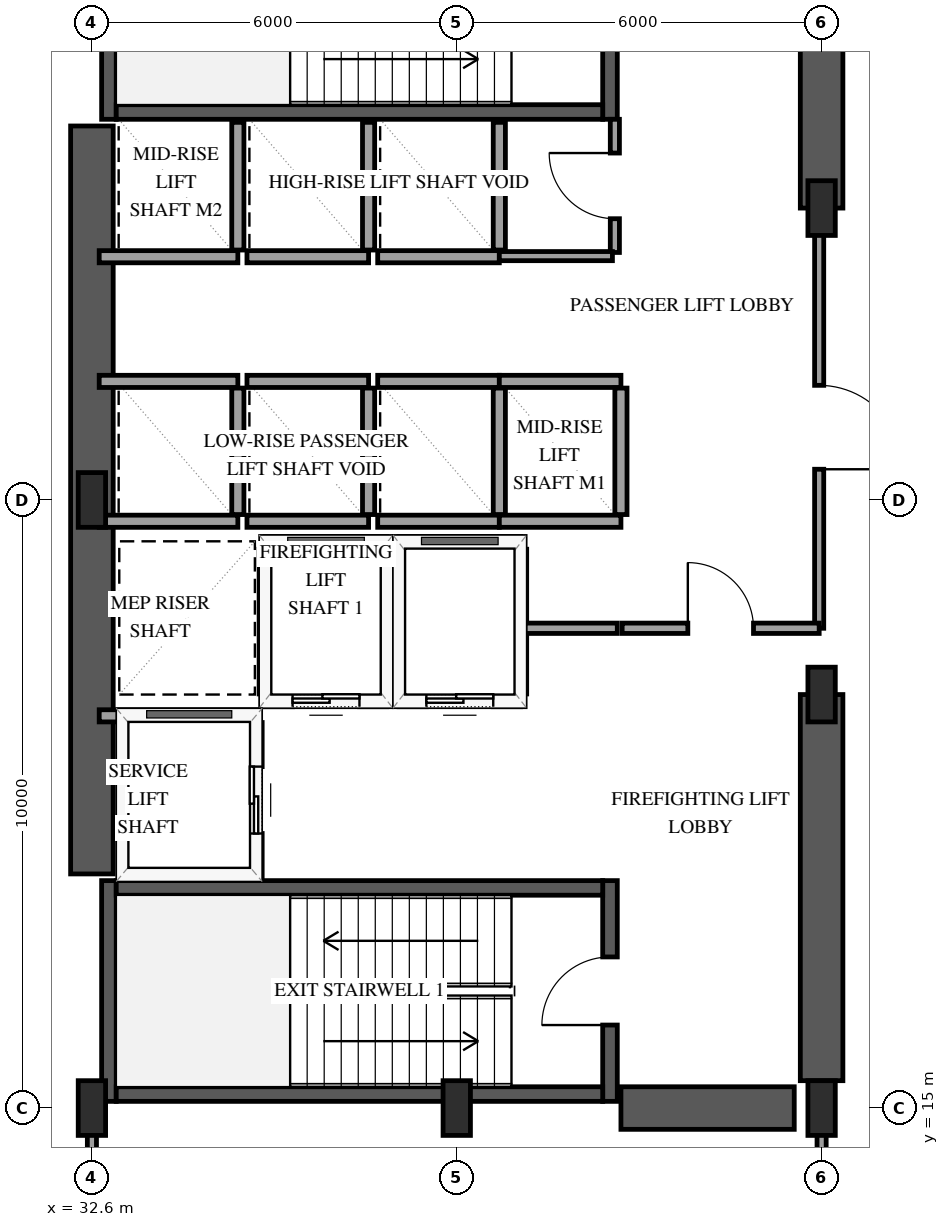
"""IFC4 building model, lengths in metres.
Left out: names, types, materials, properties, quantities, classifications, styles, units other than length and angle.
Written with IfcOpenShell. Run it as: python <this file> out.ifc"""

import sys

from ifc_helpers import new_model, si_unit, direction, frame, frame_2d, origin, origin_2d, place, context, subcontext, project, spatial, rectangle, extrude, element, fill, save


model = new_model("IFC4")
c1 = context("Model", 3, precision=1e-05, world=origin(), true_north=direction((0.0, 1.0)))
c2 = subcontext(c1, "Body", "Model", "MODEL_VIEW")
j1 = project(units=[si_unit("LENGTHUNIT", "METRE"), si_unit("PLANEANGLEUNIT", "RADIAN")], contexts=[c1])
p1 = place(None, origin())
s1 = spatial("IfcSite", under=j1, at=p1, CompositionType="ELEMENT")
p2 = place(p1, origin())
s2 = spatial("IfcBuilding", under=s1, at=p2, CompositionType="ELEMENT")
p3 = place(p2, frame((0.0, 0.0, 11.4)))
s3 = spatial("IfcBuildingStorey", under=s2, at=p3, CompositionType="ELEMENT", Elevation=11.4)
p4 = place(p3, frame((32.88, 15.11, 0.0), z_axis=(0.0, 0.0, 1.0), x_axis=(0.0, 1.0, 0.0)))
e1 = element("IfcWall", 1, at=p4, inside=s3, PredefinedType="SHEAR", context=c2, shape_type="SweptSolid", body=[
    extrude(rectangle(XDim=3.63, YDim=0.24, at=frame_2d((1.815, 0.0))), origin(), (0.0, 0.0, 1.0), 4.8),
])
p5 = place(p3, frame((41.12, 15.11, 0.0), z_axis=(0.0, 0.0, 1.0), x_axis=(0.0, 1.0, 0.0)))
e2 = element("IfcWall", 2, at=p5, inside=s3, PredefinedType="SHEAR", context=c2, shape_type="SweptSolid", body=[
    extrude(rectangle(XDim=3.63, YDim=0.24, at=frame_2d((1.815, 0.0))), origin(), (0.0, 0.0, 1.0), 4.8),
])
p6 = place(p5, frame((1.255, 0.0, 0.0)))
e3 = element("IfcOpeningElement", 3, at=p6, cuts=e2, PredefinedType="OPENING", context=c2, shape_type="SweptSolid", body=[
    extrude(rectangle(XDim=1.12, YDim=2.15, at=frame_2d((0.56, 1.075))), frame((0.0, 0.13, 0.0), z_axis=(0.0, -1.0, 0.0), x_axis=(1.0, 0.0, 0.0)), (0.0, 0.0, 1.0), 0.26),
])
for number, where, z_axis, x_axis in (
    (4, (33.0, 15.23, 0.0), (0.0, 0.0, 1.0), (1.0, 0.0, 0.0)),
    (5, (33.0, 18.62, 0.0), (0.0, 0.0, 1.0), (1.0, 0.0, 0.0)),
):
    element("IfcWall", number, at=place(p3, frame(where, z_axis=z_axis, x_axis=x_axis)), inside=s3, PredefinedType="SHEAR", context=c2, shape_type="SweptSolid", body=[
        extrude(rectangle(XDim=8.0, YDim=0.24, at=frame_2d((4.0, 0.0))), origin(), (0.0, 0.0, 1.0), 4.8),
    ])
p7 = place(p3, frame((32.88, 31.26, 0.0), z_axis=(0.0, 0.0, 1.0), x_axis=(0.0, 1.0, 0.0)))
e6 = element("IfcWall", 6, at=p7, inside=s3, PredefinedType="SHEAR", context=c2, shape_type="SweptSolid", body=[
    extrude(rectangle(XDim=3.63, YDim=0.24, at=frame_2d((1.815, 0.0))), origin(), (0.0, 0.0, 1.0), 4.8),
])
p8 = place(p3, frame((41.12, 31.26, 0.0), z_axis=(0.0, 0.0, 1.0), x_axis=(0.0, 1.0, 0.0)))
e7 = element("IfcWall", 7, at=p8, inside=s3, PredefinedType="SHEAR", context=c2, shape_type="SweptSolid", body=[
    extrude(rectangle(XDim=3.63, YDim=0.24, at=frame_2d((1.815, 0.0))), origin(), (0.0, 0.0, 1.0), 4.8),
])
p9 = place(p8, frame((1.255, 0.0, 0.0)))
e8 = element("IfcOpeningElement", 8, at=p9, cuts=e7, PredefinedType="OPENING", context=c2, shape_type="SweptSolid", body=[
    extrude(rectangle(XDim=1.12, YDim=2.15, at=frame_2d((0.56, 1.075))), frame((0.0, 0.13, 0.0), z_axis=(0.0, -1.0, 0.0), x_axis=(1.0, 0.0, 0.0)), (0.0, 0.0, 1.0), 0.26),
])
p10 = place(p3, frame((33.0, 31.38, 0.0), z_axis=(0.0, 0.0, 1.0), x_axis=(1.0, 0.0, 0.0)))
e9 = element("IfcWall", 9, at=p10, inside=s3, PredefinedType="SHEAR", context=c2, shape_type="SweptSolid", body=[
    extrude(rectangle(XDim=8.0, YDim=0.24, at=frame_2d((4.0, 0.0))), origin(), (0.0, 0.0, 1.0), 4.8),
])
p11 = place(p3, frame((32.6, 18.85, 0.0), z_axis=(0.0, 0.0, 1.0), x_axis=(0.0, 1.0, 0.0)))
e10 = element("IfcWall", 10, at=p11, inside=s3, PredefinedType="SHEAR", context=c2, shape_type="SweptSolid", body=[
    extrude(rectangle(XDim=12.3, YDim=0.7, at=frame_2d((6.15, 0.0))), origin(), (0.0, 0.0, 1.0), 4.8),
])
p12 = place(p3, frame((41.3, 15.0, 0.0), z_axis=(0.0, 0.0, 1.0), x_axis=(1.0, 0.0, 0.0)))
e11 = element("IfcWall", 11, at=p12, inside=s3, PredefinedType="SHEAR", context=c2, shape_type="SweptSolid", body=[
    extrude(rectangle(XDim=2.85, YDim=0.7, at=frame_2d((1.425, 0.0))), origin(), (0.0, 0.0, 1.0), 4.8),
])
p13 = place(p3, frame((44.6, 15.45, 0.0), z_axis=(0.0, 0.0, 1.0), x_axis=(0.0, 1.0, 0.0)))
e12 = element("IfcWall", 12, at=p13, inside=s3, PredefinedType="SHEAR", context=c2, shape_type="SweptSolid", body=[
    extrude(rectangle(XDim=6.35, YDim=0.7, at=frame_2d((3.175, 0.0))), origin(), (0.0, 0.0, 1.0), 4.8),
])
p14 = place(p3, frame((44.6, 29.8, 0.0), z_axis=(0.0, 0.0, 1.0), x_axis=(0.0, 1.0, 0.0)))
e13 = element("IfcWall", 13, at=p14, inside=s3, PredefinedType="SHEAR", context=c2, shape_type="SweptSolid", body=[
    extrude(rectangle(XDim=4.75, YDim=0.7, at=frame_2d((2.375, 0.0))), origin(), (0.0, 0.0, 1.0), 4.8),
])
for number, where, z_axis, x_axis in (
    (14, (32.6, 15.0, 0.0), (0.0, 0.0, 1.0), (1.0, 0.0, 0.0)),
    (15, (32.6, 25.0, 0.0), (0.0, 0.0, 1.0), (1.0, 0.0, 0.0)),
    (16, (38.6, 15.0, 0.0), (0.0, 0.0, 1.0), (1.0, 0.0, 0.0)),
    (17, (44.6, 15.0, 0.0), (0.0, 0.0, 1.0), (1.0, 0.0, 0.0)),
    (18, (44.6, 21.8, 0.0), (0.0, 0.0, 1.0), (1.0, 0.0, 0.0)),
    (19, (44.6, 29.8, 0.0), (0.0, 0.0, 1.0), (1.0, 0.0, 0.0)),
):
    element("IfcColumn", number, at=place(p3, frame(where, z_axis=z_axis, x_axis=x_axis)), inside=s3, PredefinedType="PILASTER", context=c2, shape_type="SweptSolid", body=[
        extrude(rectangle(XDim=0.45, YDim=0.9, at=origin_2d()), origin(), (0.0, 0.0, 1.0), 4.8),
    ])
p15 = place(p3, frame((35.45, 21.7, 0.0), z_axis=(0.0, 0.0, 1.0), x_axis=(1.0, 0.0, 0.0)))
e20 = element("IfcWall", 20, at=p15, inside=s3, PredefinedType="SOLIDWALL", context=c2, shape_type="SweptSolid", body=[
    extrude(rectangle(XDim=2.0, YDim=0.2, at=frame_2d((1.0, 0.0))), origin(), (0.0, 0.0, 1.0), 4.48),
])
p16 = place(p15, frame((0.45, 0.0, 0.0)))
e21 = element("IfcOpeningElement", 21, at=p16, cuts=e20, PredefinedType="OPENING", context=c2, shape_type="SweptSolid", body=[
    extrude(rectangle(XDim=1.1, YDim=2.15, at=frame_2d((0.55, 1.075))), frame((0.0, 0.11, 0.0), z_axis=(0.0, -1.0, 0.0), x_axis=(1.0, 0.0, 0.0)), (0.0, 0.0, 1.0), 0.22),
])
p17 = place(p3, frame((35.45, 24.3, 0.0), z_axis=(0.0, 0.0, 1.0), x_axis=(1.0, 0.0, 0.0)))
e22 = element("IfcWall", 22, at=p17, inside=s3, PredefinedType="SOLIDWALL", context=c2, shape_type="SweptSolid", body=[
    extrude(rectangle(XDim=2.0, YDim=0.2, at=frame_2d((1.0, 0.0))), origin(), (0.0, 0.0, 1.0), 4.48),
])
for number, where, z_axis, x_axis in (
    (23, (35.45, 21.81, 0.0), (0.0, 0.0, 1.0), (0.0, 1.0, 0.0)),
    (24, (37.45, 21.81, 0.0), (0.0, 0.0, 1.0), (0.0, 1.0, 0.0)),
):
    element("IfcWall", number, at=place(p3, frame(where, z_axis=z_axis, x_axis=x_axis)), inside=s3, PredefinedType="SOLIDWALL", context=c2, shape_type="SweptSolid", body=[
        extrude(rectangle(XDim=2.38, YDim=0.2, at=frame_2d((1.19, 0.0))), origin(), (0.0, 0.0, 1.0), 4.48),
    ])
p18 = place(p3, frame((37.65, 21.7, 0.0), z_axis=(0.0, 0.0, 1.0), x_axis=(1.0, 0.0, 0.0)))
e25 = element("IfcWall", 25, at=p18, inside=s3, PredefinedType="SOLIDWALL", context=c2, shape_type="SweptSolid", body=[
    extrude(rectangle(XDim=2.0, YDim=0.2, at=frame_2d((1.0, 0.0))), origin(), (0.0, 0.0, 1.0), 4.48),
])
p19 = place(p18, frame((0.45, 0.0, 0.0)))
e26 = element("IfcOpeningElement", 26, at=p19, cuts=e25, PredefinedType="OPENING", context=c2, shape_type="SweptSolid", body=[
    extrude(rectangle(XDim=1.1, YDim=2.15, at=frame_2d((0.55, 1.075))), frame((0.0, 0.11, 0.0), z_axis=(0.0, -1.0, 0.0), x_axis=(1.0, 0.0, 0.0)), (0.0, 0.0, 1.0), 0.22),
])
p20 = place(p3, frame((37.65, 24.3, 0.0), z_axis=(0.0, 0.0, 1.0), x_axis=(1.0, 0.0, 0.0)))
e27 = element("IfcWall", 27, at=p20, inside=s3, PredefinedType="SOLIDWALL", context=c2, shape_type="SweptSolid", body=[
    extrude(rectangle(XDim=2.0, YDim=0.2, at=frame_2d((1.0, 0.0))), origin(), (0.0, 0.0, 1.0), 4.48),
])
p21 = place(p3, frame((39.65, 21.81, 0.0), z_axis=(0.0, 0.0, 1.0), x_axis=(0.0, 1.0, 0.0)))
e28 = element("IfcWall", 28, at=p21, inside=s3, PredefinedType="SOLIDWALL", context=c2, shape_type="SweptSolid", body=[
    extrude(rectangle(XDim=2.38, YDim=0.2, at=frame_2d((1.19, 0.0))), origin(), (0.0, 0.0, 1.0), 4.48),
])
p22 = place(p3, frame((32.72, 21.45, 0.0), z_axis=(0.0, 0.0, 1.0), x_axis=(1.0, 0.0, 0.0)))
e29 = element("IfcWall", 29, at=p22, inside=s3, PredefinedType="SOLIDWALL", context=c2, shape_type="SweptSolid", body=[
    extrude(rectangle(XDim=2.58, YDim=0.2, at=frame_2d((1.29, 0.0))), origin(), (0.0, 0.0, 1.0), 4.48),
])
p23 = place(p3, frame((35.3, 18.79, 0.0), z_axis=(0.0, 0.0, 1.0), x_axis=(0.0, 1.0, 0.0)))
e30 = element("IfcWall", 30, at=p23, inside=s3, PredefinedType="SOLIDWALL", context=c2, shape_type="SweptSolid", body=[
    extrude(rectangle(XDim=2.55, YDim=0.2, at=frame_2d((1.275, 0.0))), origin(), (0.0, 0.0, 1.0), 4.48),
])
p24 = place(p23, frame((0.725, 0.0, 0.0)))
e31 = element("IfcOpeningElement", 31, at=p24, cuts=e30, PredefinedType="OPENING", context=c2, shape_type="SweptSolid", body=[
    extrude(rectangle(XDim=1.1, YDim=2.15, at=frame_2d((0.55, 1.075))), frame((0.0, 0.11, 0.0), z_axis=(0.0, -1.0, 0.0), x_axis=(1.0, 0.0, 0.0)), (0.0, 0.0, 1.0), 0.22),
])
for number, where, z_axis, x_axis in (
    (32, (32.72, 24.65, 0.0), (0.0, 0.0, 1.0), (1.0, 0.0, 0.0)),
    (33, (32.72, 26.95, 0.0), (0.0, 0.0, 1.0), (1.0, 0.0, 0.0)),
):
    element("IfcWall", number, at=place(p3, frame(where, z_axis=z_axis, x_axis=x_axis)), inside=s3, PredefinedType="SOLIDWALL", context=c2, shape_type="SweptSolid", body=[
        extrude(rectangle(XDim=2.28, YDim=0.2, at=frame_2d((1.14, 0.0))), origin(), (0.0, 0.0, 1.0), 4.48),
    ])
p25 = place(p3, frame((35.0, 24.76, 0.0), z_axis=(0.0, 0.0, 1.0), x_axis=(0.0, 1.0, 0.0)))
e34 = element("IfcWall", 34, at=p25, inside=s3, PredefinedType="SOLIDWALL", context=c2, shape_type="SweptSolid", body=[
    extrude(rectangle(XDim=2.08, YDim=0.2, at=frame_2d((1.04, 0.0))), origin(), (0.0, 0.0, 1.0), 4.48),
])
for number, where, z_axis, x_axis in (
    (35, (35.15, 24.65, 0.0), (0.0, 0.0, 1.0), (1.0, 0.0, 0.0)),
    (36, (35.15, 26.95, 0.0), (0.0, 0.0, 1.0), (1.0, 0.0, 0.0)),
):
    element("IfcWall", number, at=place(p3, frame(where, z_axis=z_axis, x_axis=x_axis)), inside=s3, PredefinedType="SOLIDWALL", context=c2, shape_type="SweptSolid", body=[
        extrude(rectangle(XDim=2.0, YDim=0.2, at=frame_2d((1.0, 0.0))), origin(), (0.0, 0.0, 1.0), 4.48),
    ])
p26 = place(p3, frame((37.15, 24.76, 0.0), z_axis=(0.0, 0.0, 1.0), x_axis=(0.0, 1.0, 0.0)))
e37 = element("IfcWall", 37, at=p26, inside=s3, PredefinedType="SOLIDWALL", context=c2, shape_type="SweptSolid", body=[
    extrude(rectangle(XDim=2.08, YDim=0.2, at=frame_2d((1.04, 0.0))), origin(), (0.0, 0.0, 1.0), 4.48),
])
for number, where, z_axis, x_axis in (
    (38, (37.3, 24.65, 0.0), (0.0, 0.0, 1.0), (1.0, 0.0, 0.0)),
    (39, (37.3, 26.95, 0.0), (0.0, 0.0, 1.0), (1.0, 0.0, 0.0)),
):
    element("IfcWall", number, at=place(p3, frame(where, z_axis=z_axis, x_axis=x_axis)), inside=s3, PredefinedType="SOLIDWALL", context=c2, shape_type="SweptSolid", body=[
        extrude(rectangle(XDim=2.0, YDim=0.2, at=frame_2d((1.0, 0.0))), origin(), (0.0, 0.0, 1.0), 4.48),
    ])
p27 = place(p3, frame((39.3, 24.76, 0.0), z_axis=(0.0, 0.0, 1.0), x_axis=(0.0, 1.0, 0.0)))
e40 = element("IfcWall", 40, at=p27, inside=s3, PredefinedType="SOLIDWALL", context=c2, shape_type="SweptSolid", body=[
    extrude(rectangle(XDim=2.08, YDim=0.2, at=frame_2d((1.04, 0.0))), origin(), (0.0, 0.0, 1.0), 4.48),
])
for number, where, z_axis, x_axis in (
    (41, (39.3, 24.65, 0.0), (0.0, 0.0, 1.0), (1.0, 0.0, 0.0)),
    (42, (39.3, 26.95, 0.0), (0.0, 0.0, 1.0), (1.0, 0.0, 0.0)),
):
    element("IfcWall", number, at=place(p3, frame(where, z_axis=z_axis, x_axis=x_axis)), inside=s3, PredefinedType="SOLIDWALL", context=c2, shape_type="SweptSolid", body=[
        extrude(rectangle(XDim=2.0, YDim=0.2, at=frame_2d((1.0, 0.0))), origin(), (0.0, 0.0, 1.0), 4.48),
    ])
p28 = place(p3, frame((41.3, 24.76, 0.0), z_axis=(0.0, 0.0, 1.0), x_axis=(0.0, 1.0, 0.0)))
e43 = element("IfcWall", 43, at=p28, inside=s3, PredefinedType="SOLIDWALL", context=c2, shape_type="SweptSolid", body=[
    extrude(rectangle(XDim=2.08, YDim=0.2, at=frame_2d((1.04, 0.0))), origin(), (0.0, 0.0, 1.0), 4.48),
])
p29 = place(p3, frame((32.72, 29.0, 0.0), z_axis=(0.0, 0.0, 1.0), x_axis=(1.0, 0.0, 0.0)))
e44 = element("IfcWall", 44, at=p29, inside=s3, PredefinedType="SOLIDWALL", context=c2, shape_type="SweptSolid", body=[
    extrude(rectangle(XDim=2.28, YDim=0.2, at=frame_2d((1.14, 0.0))), origin(), (0.0, 0.0, 1.0), 4.48),
])
p30 = place(p3, frame((35.0, 29.11, 0.0), z_axis=(0.0, 0.0, 1.0), x_axis=(0.0, 1.0, 0.0)))
e45 = element("IfcWall", 45, at=p30, inside=s3, PredefinedType="SOLIDWALL", context=c2, shape_type="SweptSolid", body=[
    extrude(rectangle(XDim=2.1, YDim=0.2, at=frame_2d((1.05, 0.0))), origin(), (0.0, 0.0, 1.0), 4.48),
])
p31 = place(p3, frame((35.15, 29.0, 0.0), z_axis=(0.0, 0.0, 1.0), x_axis=(1.0, 0.0, 0.0)))
e46 = element("IfcWall", 46, at=p31, inside=s3, PredefinedType="SOLIDWALL", context=c2, shape_type="SweptSolid", body=[
    extrude(rectangle(XDim=2.0, YDim=0.2, at=frame_2d((1.0, 0.0))), origin(), (0.0, 0.0, 1.0), 4.48),
])
p32 = place(p3, frame((37.15, 29.11, 0.0), z_axis=(0.0, 0.0, 1.0), x_axis=(0.0, 1.0, 0.0)))
e47 = element("IfcWall", 47, at=p32, inside=s3, PredefinedType="SOLIDWALL", context=c2, shape_type="SweptSolid", body=[
    extrude(rectangle(XDim=2.1, YDim=0.2, at=frame_2d((1.05, 0.0))), origin(), (0.0, 0.0, 1.0), 4.48),
])
p33 = place(p3, frame((37.3, 29.0, 0.0), z_axis=(0.0, 0.0, 1.0), x_axis=(1.0, 0.0, 0.0)))
e48 = element("IfcWall", 48, at=p33, inside=s3, PredefinedType="SOLIDWALL", context=c2, shape_type="SweptSolid", body=[
    extrude(rectangle(XDim=2.0, YDim=0.2, at=frame_2d((1.0, 0.0))), origin(), (0.0, 0.0, 1.0), 4.48),
])
p34 = place(p3, frame((39.3, 29.11, 0.0), z_axis=(0.0, 0.0, 1.0), x_axis=(0.0, 1.0, 0.0)))
e49 = element("IfcWall", 49, at=p34, inside=s3, PredefinedType="SOLIDWALL", context=c2, shape_type="SweptSolid", body=[
    extrude(rectangle(XDim=2.1, YDim=0.2, at=frame_2d((1.05, 0.0))), origin(), (0.0, 0.0, 1.0), 4.48),
])
p35 = place(p3, frame((32.6, 14.93, 0.0), z_axis=(0.0, 0.0, 1.0), x_axis=(0.0, -1.0, 0.0)))
e50 = element("IfcWall", 50, at=p35, inside=s3, PredefinedType="PARTITIONING", context=c2, shape_type="SweptSolid", body=[
    extrude(rectangle(XDim=7.86, YDim=0.15, at=frame_2d((3.93, 0.0))), origin(), (0.0, 0.0, 1.0), 3.602),
])
p36 = place(p3, frame((44.56, 29.8, 0.0), z_axis=(0.0, 0.0, 1.0), x_axis=(0.0, -1.0, 0.0)))
e51 = element("IfcWall", 51, at=p36, inside=s3, PredefinedType="PARTITIONING", context=c2, shape_type="SweptSolid", body=[
    extrude(rectangle(XDim=6.91, YDim=0.15, at=frame_2d((3.455, 0.0))), origin(), (0.0, 0.0, 1.0), 3.52),
])
p37 = place(p36, frame((2.915, 0.0, 0.0)))
e52 = element("IfcOpeningElement", 52, at=p37, cuts=e51, PredefinedType="OPENING", context=c2, shape_type="SweptSolid", body=[
    extrude(rectangle(XDim=1.38, YDim=2.2, at=frame_2d((0.69, 1.1))), frame((0.0, 0.085, 0.0), z_axis=(0.0, -1.0, 0.0), x_axis=(1.0, 0.0, 0.0)), (0.0, 0.0, 1.0), 0.17),
])
p38 = place(p3, frame((41.32, 22.89, 0.0), z_axis=(0.0, 0.0, 1.0), x_axis=(1.0, 0.0, 0.0)))
e53 = element("IfcWall", 53, at=p38, inside=s3, PredefinedType="PARTITIONING", context=c2, shape_type="SweptSolid", body=[
    extrude(rectangle(XDim=3.24, YDim=0.17, at=frame_2d((1.62, 0.0))), origin(), (0.0, 0.0, 1.0), 4.48),
])
p39 = place(p38, frame((1.08, 0.0, 0.0)))
e54 = element("IfcOpeningElement", 54, at=p39, cuts=e53, PredefinedType="OPENING", context=c2, shape_type="SweptSolid", body=[
    extrude(rectangle(XDim=1.08, YDim=2.15, at=frame_2d((0.54, 1.075))), frame((0.0, 0.095, 0.0), z_axis=(0.0, -1.0, 0.0), x_axis=(1.0, 0.0, 0.0)), (0.0, 0.0, 1.0), 0.19),
])
p40 = place(p3, frame((44.6, 11.87, 0.0), z_axis=(0.0, 0.0, 1.0), x_axis=(0.0, 1.0, 0.0)))
e55 = element("IfcWall", 55, at=p40, inside=s3, PredefinedType="PARTITIONING", context=c2, shape_type="SweptSolid", body=[
    extrude(rectangle(XDim=3.06, YDim=0.15, at=frame_2d((1.53, 0.0))), origin(), (0.0, 0.0, 1.0), 3.602),
])
p41 = place(p3, frame((41.2, 29.07, 0.0), z_axis=(0.0, 0.0, 1.0), x_axis=(0.0, 1.0, 0.0)))
e56 = element("IfcWall", 56, at=p41, inside=s3, PredefinedType="PARTITIONING", context=c2, shape_type="SweptSolid", body=[
    extrude(rectangle(XDim=2.19, YDim=0.15, at=frame_2d((1.095, 0.0))), origin(), (0.0, 0.0, 1.0), 4.48),
])
p42 = place(p41, frame((0.555, 0.0, 0.0)))
e57 = element("IfcOpeningElement", 57, at=p42, cuts=e56, PredefinedType="OPENING", context=c2, shape_type="SweptSolid", body=[
    extrude(rectangle(XDim=1.08, YDim=2.15, at=frame_2d((0.54, 1.075))), frame((0.0, 0.085, 0.0), z_axis=(0.0, -1.0, 0.0), x_axis=(1.0, 0.0, 0.0)), (0.0, 0.0, 1.0), 0.17),
])
p43 = place(p3, frame((39.3, 29.01, 0.0), z_axis=(0.0, 0.0, 1.0), x_axis=(1.0, 0.0, 0.0)))
e58 = element("IfcWall", 58, at=p43, inside=s3, PredefinedType="PARTITIONING", context=c2, shape_type="SweptSolid", body=[
    extrude(rectangle(XDim=1.86, YDim=0.15, at=frame_2d((0.93, 0.0))), origin(), (0.0, 0.0, 1.0), 4.48),
])
p44 = place(p3, frame((39.72, 22.89, 0.0), z_axis=(0.0, 0.0, 1.0), x_axis=(1.0, 0.0, 0.0)))
e59 = element("IfcWall", 59, at=p44, inside=s3, PredefinedType="PARTITIONING", context=c2, shape_type="SweptSolid", body=[
    extrude(rectangle(XDim=1.52, YDim=0.17, at=frame_2d((0.76, 0.0))), origin(), (0.0, 0.0, 1.0), 4.48),
])
p45 = place(p16, origin())
e60 = element("IfcDoor", 60, at=p45, inside=s3, OperationType="SLIDING_TO_LEFT", PredefinedType="DOOR", context=c2, shape_type="SweptSolid", body=[
    extrude(rectangle(XDim=1.1, YDim=2.15, at=frame_2d((0.55, 1.075))), frame((0.0, 0.025, 0.0), z_axis=(0.0, -1.0, 0.0), x_axis=(1.0, 0.0, 0.0)), (0.0, 0.0, 1.0), 0.05),
])
fill(e21, e60)
p46 = place(p19, origin())
e61 = element("IfcDoor", 61, at=p46, inside=s3, OperationType="SLIDING_TO_LEFT", PredefinedType="DOOR", context=c2, shape_type="SweptSolid", body=[
    extrude(rectangle(XDim=1.1, YDim=2.15, at=frame_2d((0.55, 1.075))), frame((0.0, 0.025, 0.0), z_axis=(0.0, -1.0, 0.0), x_axis=(1.0, 0.0, 0.0)), (0.0, 0.0, 1.0), 0.05),
])
fill(e26, e61)
p47 = place(p24, origin())
e62 = element("IfcDoor", 62, at=p47, inside=s3, OperationType="SLIDING_TO_LEFT", PredefinedType="DOOR", context=c2, shape_type="SweptSolid", body=[
    extrude(rectangle(XDim=1.1, YDim=2.15, at=frame_2d((0.55, 1.075))), frame((0.0, 0.025, 0.0), z_axis=(0.0, -1.0, 0.0), x_axis=(1.0, 0.0, 0.0)), (0.0, 0.0, 1.0), 0.05),
])
fill(e31, e62)
p48 = place(p6, origin())
e63 = element("IfcDoor", 63, at=p48, inside=s3, OperationType="SINGLE_SWING_LEFT", PredefinedType="DOOR", context=c2, shape_type="SweptSolid", body=[
    extrude(rectangle(XDim=1.12, YDim=2.15, at=frame_2d((0.56, 1.075))), frame((0.0, 0.025, 0.0), z_axis=(0.0, -1.0, 0.0), x_axis=(1.0, 0.0, 0.0)), (0.0, 0.0, 1.0), 0.05),
])
fill(e3, e63)
p49 = place(p37, origin())
e64 = element("IfcDoor", 64, at=p49, inside=s3, OperationType="SINGLE_SWING_RIGHT", PredefinedType="DOOR", context=c2, shape_type="SweptSolid", body=[
    extrude(rectangle(XDim=1.38, YDim=2.2, at=frame_2d((0.69, 1.1))), frame((0.0, 0.025, 0.0), z_axis=(0.0, -1.0, 0.0), x_axis=(1.0, 0.0, 0.0)), (0.0, 0.0, 1.0), 0.05),
])
fill(e52, e64)
p50 = place(p39, origin())
e65 = element("IfcDoor", 65, at=p50, inside=s3, OperationType="SINGLE_SWING_LEFT", PredefinedType="DOOR", context=c2, shape_type="SweptSolid", body=[
    extrude(rectangle(XDim=1.08, YDim=2.15, at=frame_2d((0.54, 1.075))), frame((0.0, 0.025, 0.0), z_axis=(0.0, -1.0, 0.0), x_axis=(1.0, 0.0, 0.0)), (0.0, 0.0, 1.0), 0.05),
])
fill(e54, e65)
p51 = place(p42, origin())
e66 = element("IfcDoor", 66, at=p51, inside=s3, OperationType="SINGLE_SWING_RIGHT", PredefinedType="DOOR", context=c2, shape_type="SweptSolid", body=[
    extrude(rectangle(XDim=1.08, YDim=2.15, at=frame_2d((0.54, 1.075))), frame((0.0, 0.025, 0.0), z_axis=(0.0, -1.0, 0.0), x_axis=(1.0, 0.0, 0.0)), (0.0, 0.0, 1.0), 0.05),
])
fill(e57, e66)
save(model, sys.argv[1])
